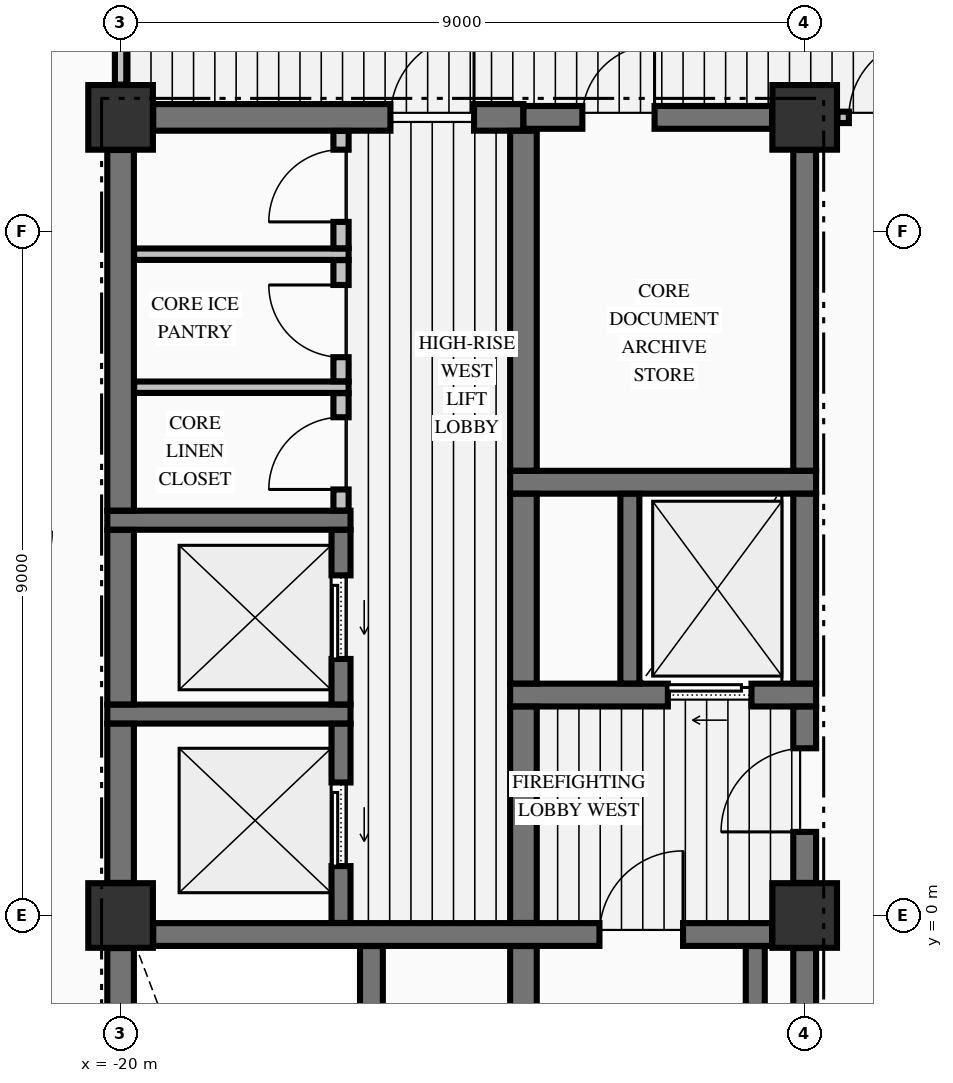
"""IFC4 building model, lengths in metres.
Left out: names, types, materials, properties, quantities, classifications, styles, units other than length and angle.
Written with IfcOpenShell. Run it as: python <this file> out.ifc"""

import sys

from ifc_helpers import new_model, si_unit, direction, frame, frame_2d, origin, origin_2d, place, context, subcontext, project, spatial, rectangle, extrude, element, fill, save


model = new_model("IFC4")
c1 = context("Model", 3, precision=1e-05, world=origin(), true_north=direction((0.0, 1.0)))
c2 = subcontext(c1, "Body", "Model", "MODEL_VIEW")
j1 = project(units=[si_unit("LENGTHUNIT", "METRE"), si_unit("PLANEANGLEUNIT", "RADIAN")], contexts=[c1])
p1 = place(None, origin())
s1 = spatial("IfcSite", under=j1, at=p1, CompositionType="ELEMENT")
p2 = place(p1, origin())
s2 = spatial("IfcBuilding", under=s1, at=p2, CompositionType="ELEMENT")
p3 = place(p2, frame((0.0, 0.0, 158.24)))
s3 = spatial("IfcBuildingStorey", under=s2, at=p3, CompositionType="ELEMENT", Elevation=158.24)
for number, where, z_axis, x_axis in (
    (1, (-20.0, 10.5, -0.425), (0.0, 0.0, 1.0), (1.0, 0.0, 0.0)),
    (2, (-11.0, 0.0, -0.425), (0.0, 0.0, 1.0), (1.0, 0.0, 0.0)),
    (3, (-11.0, 10.5, -0.425), (0.0, 0.0, 1.0), (1.0, 0.0, 0.0)),
    (4, (-20.0, 0.0, -0.425), (0.0, 0.0, 1.0), (1.0, 0.0, 0.0)),
):
    element("IfcColumn", number, at=place(p3, frame(where, z_axis=z_axis, x_axis=x_axis)), inside=s3, PredefinedType="COLUMN", context=c2, shape_type="SweptSolid", body=[
        extrude(rectangle(XDim=0.85, YDim=0.85, at=origin_2d()), origin(), (0.0, 0.0, 1.0), 4.595),
    ])
p4 = place(p3, frame((-19.571, -0.25, 0.0), z_axis=(0.0, 0.0, 1.0), x_axis=(1.0, 0.0, 0.0)))
e5 = element("IfcWall", 5, at=p4, inside=s3, PredefinedType="SHEAR", context=c2, shape_type="SweptSolid", body=[
    extrude(rectangle(XDim=8.142, YDim=0.3, at=frame_2d((4.071, 0.0))), origin(), (0.0, 0.0, 1.0), 4.17),
])
p5 = place(p4, frame((5.871, 0.0, 0.0)))
e6 = element("IfcOpeningElement", 6, at=p5, cuts=e5, PredefinedType="OPENING", context=c2, shape_type="SweptSolid", body=[
    extrude(rectangle(XDim=1.1, YDim=2.15, at=frame_2d((0.55, 1.075))), frame((0.0, 0.16, 0.0), z_axis=(0.0, -1.0, 0.0), x_axis=(1.0, 0.0, 0.0)), (0.0, 0.0, 1.0), 0.32),
])
p6 = place(p3, frame((-20.175, 2.65, 0.0), z_axis=(0.0, 0.0, 1.0), x_axis=(1.0, 0.0, 0.0)))
e7 = element("IfcWall", 7, at=p6, inside=s3, PredefinedType="SOLIDWALL", context=c2, shape_type="SweptSolid", body=[
    extrude(rectangle(XDim=3.2, YDim=0.25, at=frame_2d((1.6, 0.0))), origin(), (0.0, 0.0, 1.0), 4.17),
])
p7 = place(p3, frame((-14.875, 2.9, 0.0), z_axis=(0.0, 0.0, 1.0), x_axis=(1.0, 0.0, 0.0)))
e8 = element("IfcWall", 8, at=p7, inside=s3, PredefinedType="SHEAR", context=c2, shape_type="SweptSolid", body=[
    extrude(rectangle(XDim=4.025, YDim=0.3, at=frame_2d((2.012, 0.0))), origin(), (0.0, 0.0, 1.0), 4.17),
])
p8 = place(p7, frame((2.075, 0.0, 0.0)))
e9 = element("IfcOpeningElement", 9, at=p8, cuts=e8, PredefinedType="OPENING", context=c2, shape_type="SweptSolid", body=[
    extrude(rectangle(XDim=1.1, YDim=2.2, at=frame_2d((0.55, 1.1))), frame((0.0, 0.16, 0.0), z_axis=(0.0, -1.0, 0.0), x_axis=(1.0, 0.0, 0.0)), (0.0, 0.0, 1.0), 0.32),
])
p9 = place(p3, frame((-20.175, 5.2, 0.0), z_axis=(0.0, 0.0, 1.0), x_axis=(1.0, 0.0, 0.0)))
e10 = element("IfcWall", 10, at=p9, inside=s3, PredefinedType="SOLIDWALL", context=c2, shape_type="SweptSolid", body=[
    extrude(rectangle(XDim=3.2, YDim=0.25, at=frame_2d((1.6, 0.0))), origin(), (0.0, 0.0, 1.0), 4.17),
])
p10 = place(p3, frame((-14.875, 5.7, 0.0), z_axis=(0.0, 0.0, 1.0), x_axis=(1.0, 0.0, 0.0)))
e11 = element("IfcWall", 11, at=p10, inside=s3, PredefinedType="SHEAR", context=c2, shape_type="SweptSolid", body=[
    extrude(rectangle(XDim=4.025, YDim=0.3, at=frame_2d((2.012, 0.0))), origin(), (0.0, 0.0, 1.0), 4.17),
])
p11 = place(p3, frame((-19.571, 10.5, 0.0), z_axis=(0.0, 0.0, 1.0), x_axis=(1.0, 0.0, 0.0)))
e12 = element("IfcWall", 12, at=p11, inside=s3, PredefinedType="SHEAR", context=c2, shape_type="SweptSolid", body=[
    extrude(rectangle(XDim=4.871, YDim=0.35, at=frame_2d((2.436, 0.0))), origin(), (0.0, 0.0, 1.0), 4.17),
])
p12 = place(p11, frame((3.121, 0.0, 0.0)))
e13 = element("IfcOpeningElement", 13, at=p12, cuts=e12, PredefinedType="OPENING", context=c2, shape_type="SweptSolid", body=[
    extrude(rectangle(XDim=1.1, YDim=2.15, at=frame_2d((0.55, 1.075))), frame((0.0, 0.185, 0.0), z_axis=(0.0, -1.0, 0.0), x_axis=(1.0, 0.0, 0.0)), (0.0, 0.0, 1.0), 0.37),
])
p13 = place(p3, frame((-14.7, 10.5, 0.0), z_axis=(0.0, 0.0, 1.0), x_axis=(1.0, 0.0, 0.0)))
e14 = element("IfcWall", 14, at=p13, inside=s3, PredefinedType="SHEAR", context=c2, shape_type="SweptSolid", body=[
    extrude(rectangle(XDim=3.271, YDim=0.3, at=frame_2d((1.635, 0.0))), origin(), (0.0, 0.0, 1.0), 4.17),
])
p14 = place(p13, frame((0.775, 0.0, 0.0)))
e15 = element("IfcOpeningElement", 15, at=p14, cuts=e14, PredefinedType="OPENING", context=c2, shape_type="SweptSolid", body=[
    extrude(rectangle(XDim=0.95, YDim=2.15, at=frame_2d((0.475, 1.075))), frame((0.0, 0.16, 0.0), z_axis=(0.0, -1.0, 0.0), x_axis=(1.0, 0.0, 0.0)), (0.0, 0.0, 1.0), 0.32),
])
for number, where, z_axis, x_axis in (
    (16, (-19.822, 6.95, 0.0), (0.0, 0.0, 1.0), (1.0, 0.0, 0.0)),
    (17, (-19.822, 8.7, 0.0), (0.0, 0.0, 1.0), (1.0, 0.0, 0.0)),
):
    element("IfcWall", number, at=place(p3, frame(where, z_axis=z_axis, x_axis=x_axis)), inside=s3, PredefinedType="PARTITIONING", context=c2, shape_type="SweptSolid", body=[
        extrude(rectangle(XDim=2.822, YDim=0.15, at=frame_2d((1.411, 0.0))), origin(), (0.0, 0.0, 1.0), 4.17),
    ])
p15 = place(p3, frame((-10.569, 10.5, 0.0), z_axis=(0.0, 0.0, 1.0), x_axis=(1.0, 0.0, 0.0)))
e18 = element("IfcWall", 18, at=p15, inside=s3, PredefinedType="PARTITIONING", context=c2, shape_type="SweptSolid", body=[
    extrude(rectangle(XDim=21.138, YDim=0.15, at=frame_2d((10.569, 0.0))), origin(), (0.0, 0.0, 1.0), 4.17),
])
p16 = place(p15, frame((0.15, 0.0, 0.0)))
e19 = element("IfcOpeningElement", 19, at=p16, cuts=e18, PredefinedType="OPENING", context=c2, shape_type="SweptSolid", body=[
    extrude(rectangle(XDim=1.05, YDim=2.15, at=frame_2d((0.525, 1.075))), frame((0.0, 0.085, 0.0), z_axis=(0.0, -1.0, 0.0), x_axis=(1.0, 0.0, 0.0)), (0.0, 0.0, 1.0), 0.17),
])
p17 = place(p15, frame((19.938, 0.0, 0.0)))
e20 = element("IfcOpeningElement", 20, at=p17, cuts=e18, PredefinedType="OPENING", context=c2, shape_type="SweptSolid", body=[
    extrude(rectangle(XDim=1.05, YDim=2.15, at=frame_2d((0.525, 1.075))), frame((0.0, 0.085, 0.0), z_axis=(0.0, -1.0, 0.0), x_axis=(1.0, 0.0, 0.0)), (0.0, 0.0, 1.0), 0.17),
])
p18 = place(p3, frame((-20.0, -9.521, 0.0), z_axis=(0.0, 0.0, 1.0), x_axis=(0.0, 1.0, 0.0)))
e21 = element("IfcWall", 21, at=p18, inside=s3, PredefinedType="SHEAR", context=c2, shape_type="SweptSolid", body=[
    extrude(rectangle(XDim=9.092, YDim=0.35, at=frame_2d((4.546, 0.0))), origin(), (0.0, 0.0, 1.0), 4.17),
])
p19 = place(p3, frame((-20.0, 0.429, 0.0), z_axis=(0.0, 0.0, 1.0), x_axis=(0.0, 1.0, 0.0)))
e22 = element("IfcWall", 22, at=p19, inside=s3, PredefinedType="SHEAR", context=c2, shape_type="SweptSolid", body=[
    extrude(rectangle(XDim=2.094, YDim=0.35, at=frame_2d((1.047, 0.0))), origin(), (0.0, 0.0, 1.0), 4.17),
])
p20 = place(p3, frame((-20.0, 2.777, 0.0), z_axis=(0.0, 0.0, 1.0), x_axis=(0.0, 1.0, 0.0)))
e23 = element("IfcWall", 23, at=p20, inside=s3, PredefinedType="SHEAR", context=c2, shape_type="SweptSolid", body=[
    extrude(rectangle(XDim=2.296, YDim=0.35, at=frame_2d((1.148, 0.0))), origin(), (0.0, 0.0, 1.0), 4.17),
])
p21 = place(p3, frame((-20.0, 5.327, 0.0), z_axis=(0.0, 0.0, 1.0), x_axis=(0.0, 1.0, 0.0)))
e24 = element("IfcWall", 24, at=p21, inside=s3, PredefinedType="SHEAR", context=c2, shape_type="SweptSolid", body=[
    extrude(rectangle(XDim=4.744, YDim=0.35, at=frame_2d((2.372, 0.0))), origin(), (0.0, 0.0, 1.0), 4.17),
])
p22 = place(p3, frame((-17.1, -0.098, 0.0), z_axis=(0.0, 0.0, 1.0), x_axis=(0.0, 1.0, 0.0)))
e25 = element("IfcWall", 25, at=p22, inside=s3, PredefinedType="SOLIDWALL", context=c2, shape_type="SweptSolid", body=[
    extrude(rectangle(XDim=2.621, YDim=0.25, at=frame_2d((1.311, 0.0))), origin(), (0.0, 0.0, 1.0), 4.17),
])
p23 = place(p22, frame((0.748, 0.0, 0.0)))
e26 = element("IfcOpeningElement", 26, at=p23, cuts=e25, PredefinedType="OPENING", context=c2, shape_type="SweptSolid", body=[
    extrude(rectangle(XDim=1.1, YDim=2.2, at=frame_2d((0.55, 1.1))), frame((0.0, 0.135, 0.0), z_axis=(0.0, -1.0, 0.0), x_axis=(1.0, 0.0, 0.0)), (0.0, 0.0, 1.0), 0.27),
])
p24 = place(p3, frame((-17.1, 2.777, 0.0), z_axis=(0.0, 0.0, 1.0), x_axis=(0.0, 1.0, 0.0)))
e27 = element("IfcWall", 27, at=p24, inside=s3, PredefinedType="SOLIDWALL", context=c2, shape_type="SweptSolid", body=[
    extrude(rectangle(XDim=2.296, YDim=0.25, at=frame_2d((1.148, 0.0))), origin(), (0.0, 0.0, 1.0), 4.17),
])
p25 = place(p24, frame((0.598, 0.0, 0.0)))
e28 = element("IfcOpeningElement", 28, at=p25, cuts=e27, PredefinedType="OPENING", context=c2, shape_type="SweptSolid", body=[
    extrude(rectangle(XDim=1.1, YDim=2.2, at=frame_2d((0.55, 1.1))), frame((0.0, 0.135, 0.0), z_axis=(0.0, -1.0, 0.0), x_axis=(1.0, 0.0, 0.0)), (0.0, 0.0, 1.0), 0.27),
])
p26 = place(p3, frame((-16.7, -9.773, 0.0), z_axis=(0.0, 0.0, 1.0), x_axis=(0.0, 1.0, 0.0)))
e29 = element("IfcWall", 29, at=p26, inside=s3, PredefinedType="SHEAR", context=c2, shape_type="SweptSolid", body=[
    extrude(rectangle(XDim=9.371, YDim=0.3, at=frame_2d((4.686, 0.0))), origin(), (0.0, 0.0, 1.0), 4.17),
])
p27 = place(p3, frame((-14.7, -9.773, 0.0), z_axis=(0.0, 0.0, 1.0), x_axis=(0.0, 1.0, 0.0)))
e30 = element("IfcWall", 30, at=p27, inside=s3, PredefinedType="SHEAR", context=c2, shape_type="SweptSolid", body=[
    extrude(rectangle(XDim=9.371, YDim=0.35, at=frame_2d((4.686, 0.0))), origin(), (0.0, 0.0, 1.0), 4.17),
])
p28 = place(p3, frame((-14.7, -0.098, 0.0), z_axis=(0.0, 0.0, 1.0), x_axis=(0.0, 1.0, 0.0)))
e31 = element("IfcWall", 31, at=p28, inside=s3, PredefinedType="SHEAR", context=c2, shape_type="SweptSolid", body=[
    extrude(rectangle(XDim=2.846, YDim=0.35, at=frame_2d((1.423, 0.0))), origin(), (0.0, 0.0, 1.0), 4.17),
])
p29 = place(p3, frame((-14.7, 3.052, 0.0), z_axis=(0.0, 0.0, 1.0), x_axis=(0.0, 1.0, 0.0)))
e32 = element("IfcWall", 32, at=p29, inside=s3, PredefinedType="SHEAR", context=c2, shape_type="SweptSolid", body=[
    extrude(rectangle(XDim=2.496, YDim=0.35, at=frame_2d((1.248, 0.0))), origin(), (0.0, 0.0, 1.0), 4.17),
])
p30 = place(p3, frame((-14.7, 5.852, 0.0), z_axis=(0.0, 0.0, 1.0), x_axis=(0.0, 1.0, 0.0)))
e33 = element("IfcWall", 33, at=p30, inside=s3, PredefinedType="SHEAR", context=c2, shape_type="SweptSolid", body=[
    extrude(rectangle(XDim=4.471, YDim=0.35, at=frame_2d((2.235, 0.0))), origin(), (0.0, 0.0, 1.0), 4.17),
])
p31 = place(p3, frame((-13.3, 3.052, 0.0), z_axis=(0.0, 0.0, 1.0), x_axis=(0.0, 1.0, 0.0)))
e34 = element("IfcWall", 34, at=p31, inside=s3, PredefinedType="SOLIDWALL", context=c2, shape_type="SweptSolid", body=[
    extrude(rectangle(XDim=2.496, YDim=0.25, at=frame_2d((1.248, 0.0))), origin(), (0.0, 0.0, 1.0), 4.17),
])
p32 = place(p3, frame((-11.65, -9.798, 0.0), z_axis=(0.0, 0.0, 1.0), x_axis=(0.0, 1.0, 0.0)))
e35 = element("IfcWall", 35, at=p32, inside=s3, PredefinedType="SOLIDWALL", context=c2, shape_type="SweptSolid", body=[
    extrude(rectangle(XDim=9.396, YDim=0.25, at=frame_2d((4.698, 0.0))), origin(), (0.0, 0.0, 1.0), 4.17),
])
p33 = place(p3, frame((-11.0, -9.521, 0.0), z_axis=(0.0, 0.0, 1.0), x_axis=(0.0, 1.0, 0.0)))
e36 = element("IfcWall", 36, at=p33, inside=s3, PredefinedType="SHEAR", context=c2, shape_type="SweptSolid", body=[
    extrude(rectangle(XDim=9.092, YDim=0.3, at=frame_2d((4.546, 0.0))), origin(), (0.0, 0.0, 1.0), 4.17),
])
p34 = place(p3, frame((-11.0, 0.429, 0.0), z_axis=(0.0, 0.0, 1.0), x_axis=(0.0, 1.0, 0.0)))
e37 = element("IfcWall", 37, at=p34, inside=s3, PredefinedType="SHEAR", context=c2, shape_type="SweptSolid", body=[
    extrude(rectangle(XDim=2.319, YDim=0.3, at=frame_2d((1.16, 0.0))), origin(), (0.0, 0.0, 1.0), 4.17),
])
p35 = place(p34, frame((0.671, 0.0, 0.0)))
e38 = element("IfcOpeningElement", 38, at=p35, cuts=e37, PredefinedType="OPENING", context=c2, shape_type="SweptSolid", body=[
    extrude(rectangle(XDim=1.1, YDim=2.15, at=frame_2d((0.55, 1.075))), frame((0.0, 0.16, 0.0), z_axis=(0.0, -1.0, 0.0), x_axis=(1.0, 0.0, 0.0)), (0.0, 0.0, 1.0), 0.32),
])
p36 = place(p3, frame((-11.0, 3.052, 0.0), z_axis=(0.0, 0.0, 1.0), x_axis=(0.0, 1.0, 0.0)))
e39 = element("IfcWall", 39, at=p36, inside=s3, PredefinedType="SHEAR", context=c2, shape_type="SweptSolid", body=[
    extrude(rectangle(XDim=2.496, YDim=0.3, at=frame_2d((1.248, 0.0))), origin(), (0.0, 0.0, 1.0), 4.17),
])
p37 = place(p3, frame((-11.0, 5.852, 0.0), z_axis=(0.0, 0.0, 1.0), x_axis=(0.0, 1.0, 0.0)))
e40 = element("IfcWall", 40, at=p37, inside=s3, PredefinedType="SHEAR", context=c2, shape_type="SweptSolid", body=[
    extrude(rectangle(XDim=4.219, YDim=0.3, at=frame_2d((2.109, 0.0))), origin(), (0.0, 0.0, 1.0), 4.17),
])
p38 = place(p3, frame((-20.0, 10.931, 0.0), z_axis=(0.0, 0.0, 1.0), x_axis=(0.0, 1.0, 0.0)))
e41 = element("IfcWall", 41, at=p38, inside=s3, PredefinedType="PARTITIONING", context=c2, shape_type="SweptSolid", body=[
    extrude(rectangle(XDim=2.141, YDim=0.15, at=frame_2d((1.071, 0.0))), origin(), (0.0, 0.0, 1.0), 3.36),
])
p39 = place(p3, frame((-17.1, 5.328, 0.0), z_axis=(0.0, 0.0, 1.0), x_axis=(0.0, 1.0, 0.0)))
e42 = element("IfcWall", 42, at=p39, inside=s3, PredefinedType="PARTITIONING", context=c2, shape_type="SweptSolid", body=[
    extrude(rectangle(XDim=1.544, YDim=0.2, at=frame_2d((0.772, 0.0))), origin(), (0.0, 0.0, 1.0), 4.17),
])
p40 = place(p39, frame((0.277, 0.0, 0.0)))
e43 = element("IfcOpeningElement", 43, at=p40, cuts=e42, PredefinedType="OPENING", context=c2, shape_type="SweptSolid", body=[
    extrude(rectangle(XDim=0.95, YDim=2.15, at=frame_2d((0.475, 1.075))), frame((0.0, 0.11, 0.0), z_axis=(0.0, -1.0, 0.0), x_axis=(1.0, 0.0, 0.0)), (0.0, 0.0, 1.0), 0.22),
])
p41 = place(p3, frame((-17.1, 7.028, 0.0), z_axis=(0.0, 0.0, 1.0), x_axis=(0.0, 1.0, 0.0)))
e44 = element("IfcWall", 44, at=p41, inside=s3, PredefinedType="PARTITIONING", context=c2, shape_type="SweptSolid", body=[
    extrude(rectangle(XDim=1.594, YDim=0.2, at=frame_2d((0.797, 0.0))), origin(), (0.0, 0.0, 1.0), 4.17),
])
p42 = place(p41, frame((0.317, 0.0, 0.0)))
e45 = element("IfcOpeningElement", 45, at=p42, cuts=e44, PredefinedType="OPENING", context=c2, shape_type="SweptSolid", body=[
    extrude(rectangle(XDim=0.95, YDim=2.15, at=frame_2d((0.475, 1.075))), frame((0.0, 0.11, 0.0), z_axis=(0.0, -1.0, 0.0), x_axis=(1.0, 0.0, 0.0)), (0.0, 0.0, 1.0), 0.22),
])
p43 = place(p3, frame((-17.1, 8.778, 0.0), z_axis=(0.0, 0.0, 1.0), x_axis=(0.0, 1.0, 0.0)))
e46 = element("IfcWall", 46, at=p43, inside=s3, PredefinedType="PARTITIONING", context=c2, shape_type="SweptSolid", body=[
    extrude(rectangle(XDim=1.544, YDim=0.2, at=frame_2d((0.772, 0.0))), origin(), (0.0, 0.0, 1.0), 4.17),
])
p44 = place(p43, frame((0.347, 0.0, 0.0)))
e47 = element("IfcOpeningElement", 47, at=p44, cuts=e46, PredefinedType="OPENING", context=c2, shape_type="SweptSolid", body=[
    extrude(rectangle(XDim=0.95, YDim=2.15, at=frame_2d((0.475, 1.075))), frame((0.0, 0.11, 0.0), z_axis=(0.0, -1.0, 0.0), x_axis=(1.0, 0.0, 0.0)), (0.0, 0.0, 1.0), 0.22),
])
p45 = place(p5, origin())
e48 = element("IfcDoor", 48, at=p45, inside=s3, OperationType="SINGLE_SWING_RIGHT", PredefinedType="DOOR", context=c2, shape_type="SweptSolid", body=[
    extrude(rectangle(XDim=1.1, YDim=2.15, at=frame_2d((0.55, 1.075))), frame((0.0, 0.025, 0.0), z_axis=(0.0, -1.0, 0.0), x_axis=(1.0, 0.0, 0.0)), (0.0, 0.0, 1.0), 0.05),
])
fill(e6, e48)
p46 = place(p35, origin())
e49 = element("IfcDoor", 49, at=p46, inside=s3, OperationType="SINGLE_SWING_LEFT", PredefinedType="DOOR", context=c2, shape_type="SweptSolid", body=[
    extrude(rectangle(XDim=1.1, YDim=2.15, at=frame_2d((0.55, 1.075))), frame((0.0, 0.025, 0.0), z_axis=(0.0, -1.0, 0.0), x_axis=(1.0, 0.0, 0.0)), (0.0, 0.0, 1.0), 0.05),
])
fill(e38, e49)
p47 = place(p8, origin())
e50 = element("IfcDoor", 50, at=p47, inside=s3, OperationType="SLIDING_TO_LEFT", PredefinedType="DOOR", context=c2, shape_type="SweptSolid", body=[
    extrude(rectangle(XDim=1.1, YDim=2.2, at=frame_2d((0.55, 1.1))), frame((0.0, 0.025, 0.0), z_axis=(0.0, -1.0, 0.0), x_axis=(1.0, 0.0, 0.0)), (0.0, 0.0, 1.0), 0.05),
])
fill(e9, e50)
p48 = place(p14, origin())
e51 = element("IfcDoor", 51, at=p48, inside=s3, OperationType="SINGLE_SWING_RIGHT", PredefinedType="DOOR", context=c2, shape_type="SweptSolid", body=[
    extrude(rectangle(XDim=0.95, YDim=2.15, at=frame_2d((0.475, 1.075))), frame((0.0, 0.025, 0.0), z_axis=(0.0, -1.0, 0.0), x_axis=(1.0, 0.0, 0.0)), (0.0, 0.0, 1.0), 0.05),
])
fill(e15, e51)
p49 = place(p23, origin())
e52 = element("IfcDoor", 52, at=p49, inside=s3, OperationType="SLIDING_TO_LEFT", PredefinedType="DOOR", context=c2, shape_type="SweptSolid", body=[
    extrude(rectangle(XDim=1.1, YDim=2.2, at=frame_2d((0.55, 1.1))), frame((0.0, 0.025, 0.0), z_axis=(0.0, -1.0, 0.0), x_axis=(1.0, 0.0, 0.0)), (0.0, 0.0, 1.0), 0.05),
])
fill(e26, e52)
p50 = place(p25, origin())
e53 = element("IfcDoor", 53, at=p50, inside=s3, OperationType="SLIDING_TO_LEFT", PredefinedType="DOOR", context=c2, shape_type="SweptSolid", body=[
    extrude(rectangle(XDim=1.1, YDim=2.2, at=frame_2d((0.55, 1.1))), frame((0.0, 0.025, 0.0), z_axis=(0.0, -1.0, 0.0), x_axis=(1.0, 0.0, 0.0)), (0.0, 0.0, 1.0), 0.05),
])
fill(e28, e53)
p51 = place(p12, origin())
e54 = element("IfcDoor", 54, at=p51, inside=s3, OperationType="SINGLE_SWING_RIGHT", PredefinedType="DOOR", context=c2, shape_type="SweptSolid", body=[
    extrude(rectangle(XDim=1.1, YDim=2.15, at=frame_2d((0.55, 1.075))), frame((0.0, 0.025, 0.0), z_axis=(0.0, -1.0, 0.0), x_axis=(1.0, 0.0, 0.0)), (0.0, 0.0, 1.0), 0.05),
])
fill(e13, e54)
p52 = place(p44, origin())
e55 = element("IfcDoor", 55, at=p52, inside=s3, OperationType="SINGLE_SWING_LEFT", PredefinedType="DOOR", context=c2, shape_type="SweptSolid", body=[
    extrude(rectangle(XDim=0.95, YDim=2.15, at=frame_2d((0.475, 1.075))), frame((0.0, 0.025, 0.0), z_axis=(0.0, -1.0, 0.0), x_axis=(1.0, 0.0, 0.0)), (0.0, 0.0, 1.0), 0.05),
])
fill(e47, e55)
p53 = place(p42, origin())
e56 = element("IfcDoor", 56, at=p53, inside=s3, OperationType="SINGLE_SWING_RIGHT", PredefinedType="DOOR", context=c2, shape_type="SweptSolid", body=[
    extrude(rectangle(XDim=0.95, YDim=2.15, at=frame_2d((0.475, 1.075))), frame((0.0, 0.025, 0.0), z_axis=(0.0, -1.0, 0.0), x_axis=(1.0, 0.0, 0.0)), (0.0, 0.0, 1.0), 0.05),
])
fill(e45, e56)
p54 = place(p40, origin())
e57 = element("IfcDoor", 57, at=p54, inside=s3, OperationType="SINGLE_SWING_LEFT", PredefinedType="DOOR", context=c2, shape_type="SweptSolid", body=[
    extrude(rectangle(XDim=0.95, YDim=2.15, at=frame_2d((0.475, 1.075))), frame((0.0, 0.025, 0.0), z_axis=(0.0, -1.0, 0.0), x_axis=(1.0, 0.0, 0.0)), (0.0, 0.0, 1.0), 0.05),
])
fill(e43, e57)
p55 = place(p16, origin())
e58 = element("IfcDoor", 58, at=p55, inside=s3, OperationType="SINGLE_SWING_RIGHT", PredefinedType="DOOR", context=c2, shape_type="SweptSolid", body=[
    extrude(rectangle(XDim=1.05, YDim=2.15, at=frame_2d((0.525, 1.075))), frame((0.0, 0.025, 0.0), z_axis=(0.0, -1.0, 0.0), x_axis=(1.0, 0.0, 0.0)), (0.0, 0.0, 1.0), 0.05),
])
fill(e19, e58)
save(model, sys.argv[1])
